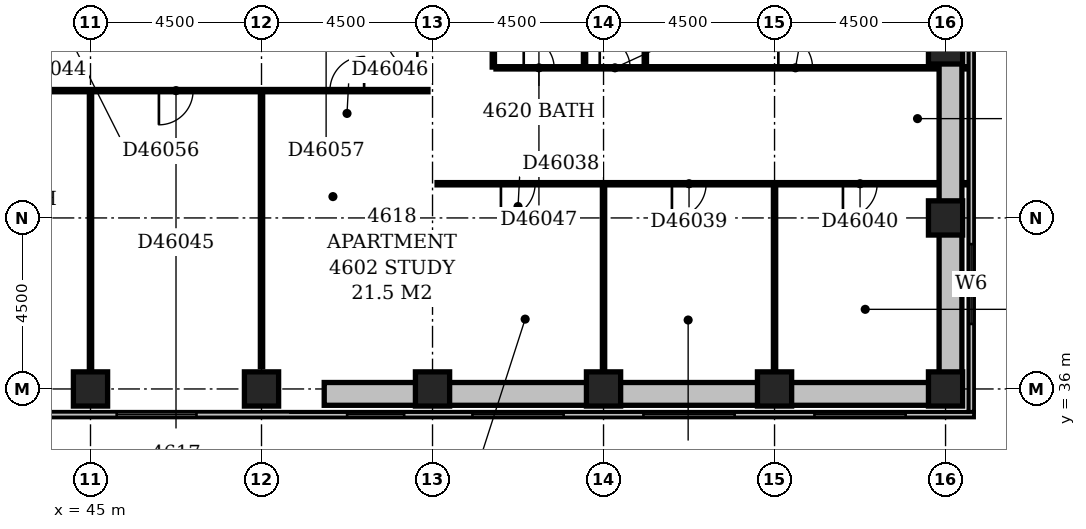
"""IFC4 building model, lengths in metres.
Left out: names, types, materials, properties, quantities, classifications, styles, units other than length and angle.
Written with IfcOpenShell. Run it as: python <this file> out.ifc"""

import sys

from ifc_helpers import new_model, si_unit, direction, frame, frame_2d, origin, origin_2d, place, context, subcontext, project, spatial, rectangle, extrude, element, fill, save


model = new_model("IFC4")
c1 = context("Model", 3, precision=1e-05, world=origin(), true_north=direction((0.0, 1.0)))
c2 = subcontext(c1, "Body", "Model", "MODEL_VIEW")
j1 = project(units=[si_unit("LENGTHUNIT", "METRE"), si_unit("PLANEANGLEUNIT", "RADIAN")], contexts=[c1])
p1 = place(None, origin())
s1 = spatial("IfcSite", under=j1, at=p1, CompositionType="ELEMENT")
p2 = place(p1, origin())
s2 = spatial("IfcBuilding", under=s1, at=p2, CompositionType="ELEMENT")
p3 = place(p2, frame((0.0, 0.0, 182.6)))
s3 = spatial("IfcBuildingStorey", under=s2, at=p3, CompositionType="ELEMENT", Elevation=182.6)
for number, where, z_axis, x_axis in (
    (1, (45.0, 36.0, -0.3), (0.0, 0.0, 1.0), (1.0, 0.0, 0.0)),
    (2, (49.5, 36.0, -0.3), (0.0, 0.0, 1.0), (1.0, 0.0, 0.0)),
    (3, (54.0, 36.0, -0.3), (0.0, 0.0, 1.0), (1.0, 0.0, 0.0)),
    (4, (58.5, 36.0, -0.3), (0.0, 0.0, 1.0), (1.0, 0.0, 0.0)),
    (5, (63.0, 36.0, -0.3), (0.0, 0.0, 1.0), (1.0, 0.0, 0.0)),
    (6, (67.5, 36.0, -0.3), (0.0, 0.0, 1.0), (1.0, 0.0, 0.0)),
    (7, (67.5, 40.5, -0.3), (0.0, 0.0, 1.0), (1.0, 0.0, 0.0)),
    (8, (67.5, 45.0, -0.3), (0.0, 0.0, 1.0), (1.0, 0.0, 0.0)),
):
    element("IfcColumn", number, at=place(p3, frame(where, z_axis=z_axis, x_axis=x_axis)), inside=s3, PredefinedType="COLUMN", context=c2, shape_type="SweptSolid", body=[
        extrude(rectangle(XDim=0.9, YDim=0.9, at=origin_2d()), origin(), (0.0, 0.0, 1.0), 3.55),
    ])
p4 = place(p3, frame((23.1, 35.325, 0.0), z_axis=(0.0, 0.0, 1.0), x_axis=(1.0, 0.0, 0.0)))
e9 = element("IfcWall", 9, at=p4, inside=s3, PredefinedType="STANDARD", context=c2, shape_type="SweptSolid", body=[
    extrude(rectangle(XDim=45.15, YDim=0.15, at=frame_2d((22.575, 0.0))), origin(), (0.0, 0.0, 1.0), 2.7),
])
p5 = place(p4, frame((1.989, 0.0, 0.6)))
e10 = element("IfcOpeningElement", 10, at=p5, cuts=e9, PredefinedType="OPENING", context=c2, shape_type="SweptSolid", body=[
    extrude(rectangle(XDim=1.2, YDim=1.8, at=frame_2d((0.6, 0.9))), frame((0.0, 0.087, 0.0), z_axis=(0.0, -1.0, 0.0), x_axis=(1.0, 0.0, 0.0)), (0.0, 0.0, 1.0), 0.174),
])
p6 = place(p4, frame((4.95, 0.0, 0.6)))
e11 = element("IfcOpeningElement", 11, at=p6, cuts=e9, PredefinedType="OPENING", context=c2, shape_type="SweptSolid", body=[
    extrude(rectangle(XDim=2.4, YDim=1.8, at=frame_2d((1.2, 0.9))), frame((0.0, 0.087, 0.0), z_axis=(0.0, -1.0, 0.0), x_axis=(1.0, 0.0, 0.0)), (0.0, 0.0, 1.0), 0.174),
])
p7 = place(p4, frame((9.45, 0.0, 0.6)))
e12 = element("IfcOpeningElement", 12, at=p7, cuts=e9, PredefinedType="OPENING", context=c2, shape_type="SweptSolid", body=[
    extrude(rectangle(XDim=2.4, YDim=1.8, at=frame_2d((1.2, 0.9))), frame((0.0, 0.087, 0.0), z_axis=(0.0, -1.0, 0.0), x_axis=(1.0, 0.0, 0.0)), (0.0, 0.0, 1.0), 0.174),
])
p8 = place(p4, frame((13.95, 0.0, 0.6)))
e13 = element("IfcOpeningElement", 13, at=p8, cuts=e9, PredefinedType="OPENING", context=c2, shape_type="SweptSolid", body=[
    extrude(rectangle(XDim=2.4, YDim=1.8, at=frame_2d((1.2, 0.9))), frame((0.0, 0.087, 0.0), z_axis=(0.0, -1.0, 0.0), x_axis=(1.0, 0.0, 0.0)), (0.0, 0.0, 1.0), 0.174),
])
p9 = place(p4, frame((18.45, 0.0, 0.6)))
e14 = element("IfcOpeningElement", 14, at=p9, cuts=e9, PredefinedType="OPENING", context=c2, shape_type="SweptSolid", body=[
    extrude(rectangle(XDim=2.4, YDim=1.8, at=frame_2d((1.2, 0.9))), frame((0.0, 0.087, 0.0), z_axis=(0.0, -1.0, 0.0), x_axis=(1.0, 0.0, 0.0)), (0.0, 0.0, 1.0), 0.174),
])
p10 = place(p4, frame((22.589, 0.0, 0.6)))
e15 = element("IfcOpeningElement", 15, at=p10, cuts=e9, PredefinedType="OPENING", context=c2, shape_type="SweptSolid", body=[
    extrude(rectangle(XDim=2.1, YDim=1.8, at=frame_2d((1.05, 0.9))), frame((0.0, 0.087, 0.0), z_axis=(0.0, -1.0, 0.0), x_axis=(1.0, 0.0, 0.0)), (0.0, 0.0, 1.0), 0.174),
])
p11 = place(p4, frame((28.653, 0.0, 0.6)))
e16 = element("IfcOpeningElement", 16, at=p11, cuts=e9, PredefinedType="OPENING", context=c2, shape_type="SweptSolid", body=[
    extrude(rectangle(XDim=1.5, YDim=1.8, at=frame_2d((0.75, 0.9))), frame((0.0, 0.087, 0.0), z_axis=(0.0, -1.0, 0.0), x_axis=(1.0, 0.0, 0.0)), (0.0, 0.0, 1.0), 0.174),
])
p12 = place(p4, frame((31.95, 0.0, 0.6)))
e17 = element("IfcOpeningElement", 17, at=p12, cuts=e9, PredefinedType="OPENING", context=c2, shape_type="SweptSolid", body=[
    extrude(rectangle(XDim=2.4, YDim=1.8, at=frame_2d((1.2, 0.9))), frame((0.0, 0.087, 0.0), z_axis=(0.0, -1.0, 0.0), x_axis=(1.0, 0.0, 0.0)), (0.0, 0.0, 1.0), 0.174),
])
p13 = place(p4, frame((36.45, 0.0, 0.6)))
e18 = element("IfcOpeningElement", 18, at=p13, cuts=e9, PredefinedType="OPENING", context=c2, shape_type="SweptSolid", body=[
    extrude(rectangle(XDim=2.4, YDim=1.8, at=frame_2d((1.2, 0.9))), frame((0.0, 0.087, 0.0), z_axis=(0.0, -1.0, 0.0), x_axis=(1.0, 0.0, 0.0)), (0.0, 0.0, 1.0), 0.174),
])
p14 = place(p4, frame((40.95, 0.0, 0.6)))
e19 = element("IfcOpeningElement", 19, at=p14, cuts=e9, PredefinedType="OPENING", context=c2, shape_type="SweptSolid", body=[
    extrude(rectangle(XDim=2.4, YDim=1.8, at=frame_2d((1.2, 0.9))), frame((0.0, 0.087, 0.0), z_axis=(0.0, -1.0, 0.0), x_axis=(1.0, 0.0, 0.0)), (0.0, 0.0, 1.0), 0.174),
])
p15 = place(p3, frame((68.175, 35.4, 0.0), z_axis=(0.0, 0.0, 1.0), x_axis=(0.0, 1.0, 0.0)))
e20 = element("IfcWall", 20, at=p15, inside=s3, PredefinedType="STANDARD", context=c2, shape_type="SweptSolid", body=[
    extrude(rectangle(XDim=23.85, YDim=0.15, at=frame_2d((11.925, 0.0))), origin(), (0.0, 0.0, 1.0), 2.7),
])
p16 = place(p15, frame((2.311, 0.0, 0.6)))
e21 = element("IfcOpeningElement", 21, at=p16, cuts=e20, PredefinedType="OPENING", context=c2, shape_type="SweptSolid", body=[
    extrude(rectangle(XDim=2.1, YDim=1.8, at=frame_2d((1.05, 0.9))), frame((0.0, 0.087, 0.0), z_axis=(0.0, -1.0, 0.0), x_axis=(1.0, 0.0, 0.0)), (0.0, 0.0, 1.0), 0.174),
])
p17 = place(p15, frame((10.65, 0.0, 0.6)))
e22 = element("IfcOpeningElement", 22, at=p17, cuts=e20, PredefinedType="OPENING", context=c2, shape_type="SweptSolid", body=[
    extrude(rectangle(XDim=2.4, YDim=1.8, at=frame_2d((1.2, 0.9))), frame((0.0, 0.087, 0.0), z_axis=(0.0, -1.0, 0.0), x_axis=(1.0, 0.0, 0.0)), (0.0, 0.0, 1.0), 0.174),
])
p18 = place(p3, frame((67.63, 58.53, 3.6), z_axis=(0.0, 0.0, 1.0), x_axis=(0.0, -1.0, 0.0)))
e23 = element("IfcWall", 23, at=p18, inside=s3, PredefinedType="STANDARD", context=c2, shape_type="SweptSolid", body=[
    extrude(rectangle(XDim=22.56, YDim=0.6, at=frame_2d((11.28, 0.0))), origin(), (0.0, 0.0, 1.0), 0.6),
])
p19 = place(p3, frame((67.53, 35.87, 3.6), z_axis=(0.0, 0.0, 1.0), x_axis=(-1.0, 0.0, 0.0)))
e24 = element("IfcWall", 24, at=p19, inside=s3, PredefinedType="STANDARD", context=c2, shape_type="SweptSolid", body=[
    extrude(rectangle(XDim=16.38, YDim=0.6, at=frame_2d((8.19, 0.0))), origin(), (0.0, 0.0, 1.0), 0.6),
])
p20 = place(p3, frame((45.0, 36.45, 0.0), z_axis=(0.0, 0.0, 1.0), x_axis=(0.0, 1.0, 0.0)))
e25 = element("IfcWall", 25, at=p20, inside=s3, PredefinedType="PARTITIONING", context=c2, shape_type="SweptSolid", body=[
    extrude(rectangle(XDim=7.35, YDim=0.1, at=frame_2d((3.675, 0.0))), origin(), (0.0, 0.0, 1.0), 2.55),
])
p21 = place(p3, frame((49.5, 36.566, 0.0), z_axis=(0.0, 0.0, 1.0), x_axis=(0.0, 1.0, 0.0)))
e26 = element("IfcWall", 26, at=p21, inside=s3, PredefinedType="PARTITIONING", context=c2, shape_type="SweptSolid", body=[
    extrude(rectangle(XDim=7.234, YDim=0.1, at=frame_2d((3.617, 0.0))), origin(), (0.0, 0.0, 1.0), 3.25),
])
p22 = place(p3, frame((58.5, 36.45, 0.0), z_axis=(0.0, 0.0, 1.0), x_axis=(0.0, 1.0, 0.0)))
e27 = element("IfcWall", 27, at=p22, inside=s3, PredefinedType="PARTITIONING", context=c2, shape_type="SweptSolid", body=[
    extrude(rectangle(XDim=4.9, YDim=0.1, at=frame_2d((2.45, 0.0))), origin(), (0.0, 0.0, 1.0), 3.25),
])
p23 = place(p3, frame((63.0, 36.45, 0.0), z_axis=(0.0, 0.0, 1.0), x_axis=(0.0, 1.0, 0.0)))
e28 = element("IfcWall", 28, at=p23, inside=s3, PredefinedType="PARTITIONING", context=c2, shape_type="SweptSolid", body=[
    extrude(rectangle(XDim=4.9, YDim=0.1, at=frame_2d((2.45, 0.0))), origin(), (0.0, 0.0, 1.0), 2.35),
])
p24 = place(p3, frame((54.1, 41.4, 0.0), z_axis=(0.0, 0.0, 1.0), x_axis=(1.0, 0.0, 0.0)))
e29 = element("IfcWall", 29, at=p24, inside=s3, PredefinedType="PARTITIONING", context=c2, shape_type="SweptSolid", body=[
    extrude(rectangle(XDim=14.0, YDim=0.1, at=frame_2d((7.0, 0.0))), origin(), (0.0, 0.0, 1.0), 3.25),
])
p25 = place(p24, frame((1.7, 0.0, 0.0)))
e30 = element("IfcOpeningElement", 30, at=p25, cuts=e29, PredefinedType="OPENING", context=c2, shape_type="SweptSolid", body=[
    extrude(rectangle(XDim=0.9, YDim=2.1, at=frame_2d((0.45, 1.05))), frame((0.0, 0.062, 0.0), z_axis=(0.0, -1.0, 0.0), x_axis=(1.0, 0.0, 0.0)), (0.0, 0.0, 1.0), 0.124),
])
p26 = place(p24, frame((6.2, 0.0, 0.0)))
e31 = element("IfcOpeningElement", 31, at=p26, cuts=e29, PredefinedType="OPENING", context=c2, shape_type="SweptSolid", body=[
    extrude(rectangle(XDim=0.9, YDim=2.1, at=frame_2d((0.45, 1.05))), frame((0.0, 0.062, 0.0), z_axis=(0.0, -1.0, 0.0), x_axis=(1.0, 0.0, 0.0)), (0.0, 0.0, 1.0), 0.124),
])
p27 = place(p24, frame((10.7, 0.0, 0.0)))
e32 = element("IfcOpeningElement", 32, at=p27, cuts=e29, PredefinedType="OPENING", context=c2, shape_type="SweptSolid", body=[
    extrude(rectangle(XDim=0.9, YDim=2.1, at=frame_2d((0.45, 1.05))), frame((0.0, 0.062, 0.0), z_axis=(0.0, -1.0, 0.0), x_axis=(1.0, 0.0, 0.0)), (0.0, 0.0, 1.0), 0.124),
])
p28 = place(p3, frame((40.6, 43.85, 0.0), z_axis=(0.0, 0.0, 1.0), x_axis=(1.0, 0.0, 0.0)))
e33 = element("IfcWall", 33, at=p28, inside=s3, PredefinedType="PARTITIONING", context=c2, shape_type="SweptSolid", body=[
    extrude(rectangle(XDim=13.3, YDim=0.1, at=frame_2d((6.65, 0.0))), origin(), (0.0, 0.0, 1.0), 3.25),
])
p29 = place(p28, frame((1.7, 0.0, 0.0)))
e34 = element("IfcOpeningElement", 34, at=p29, cuts=e33, PredefinedType="OPENING", context=c2, shape_type="SweptSolid", body=[
    extrude(rectangle(XDim=0.9, YDim=2.1, at=frame_2d((0.45, 1.05))), frame((0.0, 0.062, 0.0), z_axis=(0.0, -1.0, 0.0), x_axis=(1.0, 0.0, 0.0)), (0.0, 0.0, 1.0), 0.124),
])
p30 = place(p28, frame((6.2, 0.0, 0.0)))
e35 = element("IfcOpeningElement", 35, at=p30, cuts=e33, PredefinedType="OPENING", context=c2, shape_type="SweptSolid", body=[
    extrude(rectangle(XDim=0.9, YDim=2.1, at=frame_2d((0.45, 1.05))), frame((0.0, 0.062, 0.0), z_axis=(0.0, -1.0, 0.0), x_axis=(1.0, 0.0, 0.0)), (0.0, 0.0, 1.0), 0.124),
])
p31 = place(p28, frame((10.7, 0.0, 0.0)))
e36 = element("IfcOpeningElement", 36, at=p31, cuts=e33, PredefinedType="OPENING", context=c2, shape_type="SweptSolid", body=[
    extrude(rectangle(XDim=0.9, YDim=2.1, at=frame_2d((0.45, 1.05))), frame((0.0, 0.062, 0.0), z_axis=(0.0, -1.0, 0.0), x_axis=(1.0, 0.0, 0.0)), (0.0, 0.0, 1.0), 0.124),
])
p32 = place(p3, frame((55.6, 44.45, 0.0), z_axis=(0.0, 0.0, 1.0), x_axis=(0.0, 1.0, 0.0)))
e37 = element("IfcWall", 37, at=p32, inside=s3, PredefinedType="PLUMBINGWALL", context=c2, shape_type="SweptSolid", body=[
    extrude(rectangle(XDim=4.95, YDim=0.1, at=frame_2d((2.475, 0.0))), origin(), (0.0, 0.0, 1.0), 3.25),
])
p33 = place(p3, frame((55.65, 44.45, 0.0), z_axis=(0.0, 0.0, 1.0), x_axis=(1.0, 0.0, 0.0)))
e38 = element("IfcWall", 38, at=p33, inside=s3, PredefinedType="PARTITIONING", context=c2, shape_type="SweptSolid", body=[
    extrude(rectangle(XDim=12.45, YDim=0.1, at=frame_2d((6.225, 0.0))), origin(), (0.0, 0.0, 1.0), 3.25),
])
p34 = place(p33, frame((0.75, 0.0, 0.0)))
e39 = element("IfcOpeningElement", 39, at=p34, cuts=e38, PredefinedType="OPENING", context=c2, shape_type="SweptSolid", body=[
    extrude(rectangle(XDim=0.8, YDim=2.1, at=frame_2d((0.4, 1.05))), frame((0.0, 0.062, 0.0), z_axis=(0.0, -1.0, 0.0), x_axis=(1.0, 0.0, 0.0)), (0.0, 0.0, 1.0), 0.124),
])
p35 = place(p33, frame((7.45, 0.0, 0.0)))
e40 = element("IfcOpeningElement", 40, at=p35, cuts=e38, PredefinedType="OPENING", context=c2, shape_type="SweptSolid", body=[
    extrude(rectangle(XDim=0.9, YDim=2.1, at=frame_2d((0.45, 1.05))), frame((0.0, 0.062, 0.0), z_axis=(0.0, -1.0, 0.0), x_axis=(1.0, 0.0, 0.0)), (0.0, 0.0, 1.0), 0.124),
])
p36 = place(p33, frame((2.75, 0.0, 0.0)))
e41 = element("IfcOpeningElement", 41, at=p36, cuts=e38, PredefinedType="OPENING", context=c2, shape_type="SweptSolid", body=[
    extrude(rectangle(XDim=0.8, YDim=2.1, at=frame_2d((0.4, 1.05))), frame((0.0, 0.062, 0.0), z_axis=(0.0, -1.0, 0.0), x_axis=(1.0, 0.0, 0.0)), (0.0, 0.0, 1.0), 0.124),
])
p37 = place(p3, frame((58.0, 44.5, 0.0), z_axis=(0.0, 0.0, 1.0), x_axis=(0.0, 1.0, 0.0)))
e42 = element("IfcWall", 42, at=p37, inside=s3, PredefinedType="PLUMBINGWALL", context=c2, shape_type="SweptSolid", body=[
    extrude(rectangle(XDim=4.9, YDim=0.1, at=frame_2d((2.45, 0.0))), origin(), (0.0, 0.0, 1.0), 3.25),
])
p38 = place(p3, frame((59.6, 44.5, 0.0), z_axis=(0.0, 0.0, 1.0), x_axis=(0.0, 1.0, 0.0)))
e43 = element("IfcWall", 43, at=p38, inside=s3, PredefinedType="PARTITIONING", context=c2, shape_type="SweptSolid", body=[
    extrude(rectangle(XDim=4.9, YDim=0.1, at=frame_2d((2.45, 0.0))), origin(), (0.0, 0.0, 1.0), 3.25),
])
p39 = place(p10, origin())
e44 = element("IfcWindow", 44, at=p39, inside=s3, PartitioningType="SINGLE_PANEL", PredefinedType="WINDOW", context=c2, shape_type="SweptSolid", body=[
    extrude(rectangle(XDim=2.1, YDim=1.8, at=frame_2d((1.05, 0.9))), frame((0.0, 0.03, 0.0), z_axis=(0.0, -1.0, 0.0), x_axis=(1.0, 0.0, 0.0)), (0.0, 0.0, 1.0), 0.06),
])
fill(e15, e44)
p40 = place(p11, origin())
e45 = element("IfcWindow", 45, at=p40, inside=s3, PartitioningType="SINGLE_PANEL", PredefinedType="WINDOW", context=c2, shape_type="SweptSolid", body=[
    extrude(rectangle(XDim=1.5, YDim=1.8, at=frame_2d((0.75, 0.9))), frame((0.0, 0.03, 0.0), z_axis=(0.0, -1.0, 0.0), x_axis=(1.0, 0.0, 0.0)), (0.0, 0.0, 1.0), 0.06),
])
fill(e16, e45)
p41 = place(p12, origin())
e46 = element("IfcWindow", 46, at=p41, inside=s3, PartitioningType="SINGLE_PANEL", PredefinedType="WINDOW", context=c2, shape_type="SweptSolid", body=[
    extrude(rectangle(XDim=2.4, YDim=1.8, at=frame_2d((1.2, 0.9))), frame((0.0, 0.03, 0.0), z_axis=(0.0, -1.0, 0.0), x_axis=(1.0, 0.0, 0.0)), (0.0, 0.0, 1.0), 0.06),
])
fill(e17, e46)
p42 = place(p13, origin())
e47 = element("IfcWindow", 47, at=p42, inside=s3, PartitioningType="SINGLE_PANEL", PredefinedType="WINDOW", context=c2, shape_type="SweptSolid", body=[
    extrude(rectangle(XDim=2.4, YDim=1.8, at=frame_2d((1.2, 0.9))), frame((0.0, 0.03, 0.0), z_axis=(0.0, -1.0, 0.0), x_axis=(1.0, 0.0, 0.0)), (0.0, 0.0, 1.0), 0.06),
])
fill(e18, e47)
p43 = place(p14, origin())
e48 = element("IfcWindow", 48, at=p43, inside=s3, PartitioningType="SINGLE_PANEL", PredefinedType="WINDOW", context=c2, shape_type="SweptSolid", body=[
    extrude(rectangle(XDim=2.4, YDim=1.8, at=frame_2d((1.2, 0.9))), frame((0.0, 0.03, 0.0), z_axis=(0.0, -1.0, 0.0), x_axis=(1.0, 0.0, 0.0)), (0.0, 0.0, 1.0), 0.06),
])
fill(e19, e48)
p44 = place(p16, origin())
e49 = element("IfcWindow", 49, at=p44, inside=s3, PartitioningType="SINGLE_PANEL", PredefinedType="WINDOW", context=c2, shape_type="SweptSolid", body=[
    extrude(rectangle(XDim=2.1, YDim=1.8, at=frame_2d((1.05, 0.9))), frame((0.0, 0.03, 0.0), z_axis=(0.0, -1.0, 0.0), x_axis=(1.0, 0.0, 0.0)), (0.0, 0.0, 1.0), 0.06),
])
fill(e21, e49)
p45 = place(p25, frame((0.9, 0.0, 0.0), z_axis=(0.0, 0.0, 1.0), x_axis=(-1.0, 0.0, 0.0)))
e50 = element("IfcDoor", 50, at=p45, inside=s3, OperationType="SINGLE_SWING_RIGHT", PredefinedType="DOOR", context=c2, shape_type="SweptSolid", body=[
    extrude(rectangle(XDim=0.9, YDim=2.1, at=frame_2d((0.45, 1.05))), frame((0.0, 0.025, 0.0), z_axis=(0.0, -1.0, 0.0), x_axis=(1.0, 0.0, 0.0)), (0.0, 0.0, 1.0), 0.05),
])
fill(e30, e50)
p46 = place(p26, frame((0.9, 0.0, 0.0), z_axis=(0.0, 0.0, 1.0), x_axis=(-1.0, 0.0, 0.0)))
e51 = element("IfcDoor", 51, at=p46, inside=s3, OperationType="SINGLE_SWING_RIGHT", PredefinedType="DOOR", context=c2, shape_type="SweptSolid", body=[
    extrude(rectangle(XDim=0.9, YDim=2.1, at=frame_2d((0.45, 1.05))), frame((0.0, 0.025, 0.0), z_axis=(0.0, -1.0, 0.0), x_axis=(1.0, 0.0, 0.0)), (0.0, 0.0, 1.0), 0.05),
])
fill(e31, e51)
p47 = place(p27, frame((0.9, 0.0, 0.0), z_axis=(0.0, 0.0, 1.0), x_axis=(-1.0, 0.0, 0.0)))
e52 = element("IfcDoor", 52, at=p47, inside=s3, OperationType="SINGLE_SWING_RIGHT", PredefinedType="DOOR", context=c2, shape_type="SweptSolid", body=[
    extrude(rectangle(XDim=0.9, YDim=2.1, at=frame_2d((0.45, 1.05))), frame((0.0, 0.025, 0.0), z_axis=(0.0, -1.0, 0.0), x_axis=(1.0, 0.0, 0.0)), (0.0, 0.0, 1.0), 0.05),
])
fill(e32, e52)
p48 = place(p30, frame((0.9, 0.0, 0.0), z_axis=(0.0, 0.0, 1.0), x_axis=(-1.0, 0.0, 0.0)))
e53 = element("IfcDoor", 53, at=p48, inside=s3, OperationType="SINGLE_SWING_RIGHT", PredefinedType="DOOR", context=c2, shape_type="SweptSolid", body=[
    extrude(rectangle(XDim=0.9, YDim=2.1, at=frame_2d((0.45, 1.05))), frame((0.0, 0.025, 0.0), z_axis=(0.0, -1.0, 0.0), x_axis=(1.0, 0.0, 0.0)), (0.0, 0.0, 1.0), 0.05),
])
fill(e35, e53)
p49 = place(p31, frame((0.9, 0.0, 0.0), z_axis=(0.0, 0.0, 1.0), x_axis=(-1.0, 0.0, 0.0)))
e54 = element("IfcDoor", 54, at=p49, inside=s3, OperationType="SINGLE_SWING_LEFT", PredefinedType="DOOR", context=c2, shape_type="SweptSolid", body=[
    extrude(rectangle(XDim=0.9, YDim=2.1, at=frame_2d((0.45, 1.05))), frame((0.0, 0.025, 0.0), z_axis=(0.0, -1.0, 0.0), x_axis=(1.0, 0.0, 0.0)), (0.0, 0.0, 1.0), 0.05),
])
fill(e36, e54)
p50 = place(p34, origin())
e55 = element("IfcDoor", 55, at=p50, inside=s3, OperationType="SINGLE_SWING_LEFT", PredefinedType="DOOR", context=c2, shape_type="SweptSolid", body=[
    extrude(rectangle(XDim=0.8, YDim=2.1, at=frame_2d((0.4, 1.05))), frame((0.0, 0.025, 0.0), z_axis=(0.0, -1.0, 0.0), x_axis=(1.0, 0.0, 0.0)), (0.0, 0.0, 1.0), 0.05),
])
fill(e39, e55)
p51 = place(p35, origin())
e56 = element("IfcDoor", 56, at=p51, inside=s3, OperationType="SINGLE_SWING_LEFT", PredefinedType="DOOR", context=c2, shape_type="SweptSolid", body=[
    extrude(rectangle(XDim=0.9, YDim=2.1, at=frame_2d((0.45, 1.05))), frame((0.0, 0.025, 0.0), z_axis=(0.0, -1.0, 0.0), x_axis=(1.0, 0.0, 0.0)), (0.0, 0.0, 1.0), 0.05),
])
fill(e40, e56)
p52 = place(p36, origin())
e57 = element("IfcDoor", 57, at=p52, inside=s3, OperationType="SINGLE_SWING_LEFT", PredefinedType="DOOR", context=c2, shape_type="SweptSolid", body=[
    extrude(rectangle(XDim=0.8, YDim=2.1, at=frame_2d((0.4, 1.05))), frame((0.0, 0.025, 0.0), z_axis=(0.0, -1.0, 0.0), x_axis=(1.0, 0.0, 0.0)), (0.0, 0.0, 1.0), 0.05),
])
fill(e41, e57)
save(model, sys.argv[1])
